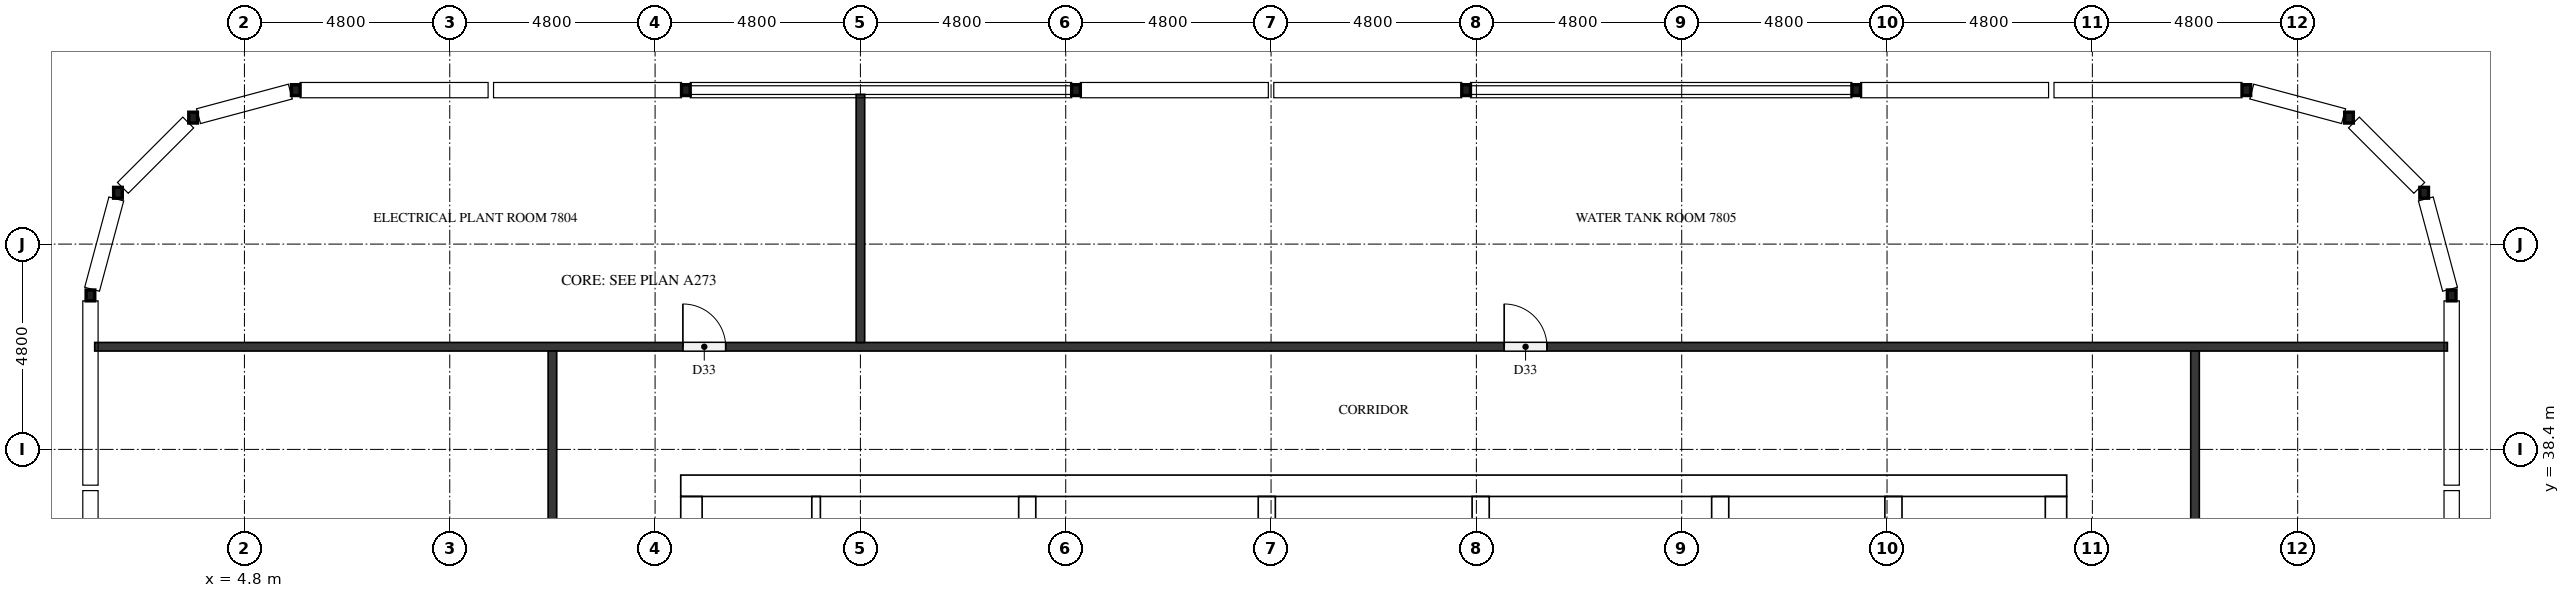
"""IFC4 building model, lengths in metres.
Left out: names, types, materials, properties, quantities, classifications, styles, units other than length and angle.
Written with IfcOpenShell. Run it as: python <this file> out.ifc"""

import sys

from ifc_helpers import new_model, si_unit, direction, frame, frame_2d, origin, origin_2d, place, context, subcontext, project, spatial, rectangle, hollow_rectangle, extrude, element, fill, save


model = new_model("IFC4")
c1 = context("Model", 3, precision=1e-05, world=origin(), true_north=direction((0.0, 1.0)))
c2 = subcontext(c1, "Body", "Model", "MODEL_VIEW")
j1 = project(units=[si_unit("LENGTHUNIT", "METRE"), si_unit("PLANEANGLEUNIT", "RADIAN")], contexts=[c1])
p1 = place(None, origin())
s1 = spatial("IfcSite", under=j1, at=p1, CompositionType="ELEMENT")
p2 = place(p1, origin())
s2 = spatial("IfcBuilding", under=s1, at=p2, CompositionType="ELEMENT")
p3 = place(p2, frame((0.0, 0.0, 301.1)))
s3 = spatial("IfcBuildingStorey", under=s2, at=p3, CompositionType="ELEMENT", Elevation=301.1)
p4 = place(p3, frame((15.0, 37.55, 0.0), z_axis=(0.0, 0.0, 1.0), x_axis=(1.0, 0.0, 0.0)))
e1 = element("IfcWall", 1, at=p4, inside=s3, PredefinedType="SHEAR", context=c2, shape_type="SweptSolid", body=[
    extrude(rectangle(XDim=32.4, YDim=0.5, at=frame_2d((16.2, 0.0))), origin(), (0.0, 0.0, 1.0), 4.4),
])
p5 = place(p4, frame((15.3, 0.0, 0.0)))
e2 = element("IfcOpeningElement", 2, at=p5, cuts=e1, PredefinedType="OPENING", context=c2, shape_type="SweptSolid", body=[
    extrude(rectangle(XDim=1.8, YDim=2.1, at=frame_2d((0.9, 1.05))), frame((0.0, 0.26, 0.0), z_axis=(0.0, -1.0, 0.0), x_axis=(1.0, 0.0, 0.0)), (0.0, 0.0, 1.0), 0.52),
])
p6 = place(p4, frame((1.282, 0.0, 0.0)))
e3 = element("IfcOpeningElement", 3, at=p6, cuts=e1, PredefinedType="OPENING", context=c2, shape_type="SweptSolid", body=[
    extrude(rectangle(XDim=1.0, YDim=2.1, at=frame_2d((0.5, 1.05))), frame((0.0, 0.26, 0.0), z_axis=(0.0, -1.0, 0.0), x_axis=(1.0, 0.0, 0.0)), (0.0, 0.0, 1.0), 0.52),
])
p7 = place(p4, frame((5.082, 0.0, 0.0)))
e4 = element("IfcOpeningElement", 4, at=p7, cuts=e1, PredefinedType="OPENING", context=c2, shape_type="SweptSolid", body=[
    extrude(rectangle(XDim=1.0, YDim=2.1, at=frame_2d((0.5, 1.05))), frame((0.0, 0.26, 0.0), z_axis=(0.0, -1.0, 0.0), x_axis=(1.0, 0.0, 0.0)), (0.0, 0.0, 1.0), 0.52),
])
p8 = place(p3, frame((15.25, 15.5, 0.0), z_axis=(0.0, 0.0, 1.0), x_axis=(0.0, 1.0, 0.0)))
e5 = element("IfcWall", 5, at=p8, inside=s3, PredefinedType="SHEAR", context=c2, shape_type="SweptSolid", body=[
    extrude(rectangle(XDim=21.8, YDim=0.5, at=frame_2d((10.9, 0.0))), origin(), (0.0, 0.0, 1.0), 4.4),
])
p9 = place(p8, frame((5.26, 0.0, 0.0)))
e6 = element("IfcOpeningElement", 6, at=p9, cuts=e5, PredefinedType="OPENING", context=c2, shape_type="SweptSolid", body=[
    extrude(rectangle(XDim=1.2, YDim=2.1, at=frame_2d((0.6, 1.05))), frame((0.0, 0.26, 0.0), z_axis=(0.0, -1.0, 0.0), x_axis=(1.0, 0.0, 0.0)), (0.0, 0.0, 1.0), 0.52),
])
p10 = place(p3, frame((47.15, 15.5, 0.0), z_axis=(0.0, 0.0, 1.0), x_axis=(0.0, 1.0, 0.0)))
e7 = element("IfcWall", 7, at=p10, inside=s3, PredefinedType="SHEAR", context=c2, shape_type="SweptSolid", body=[
    extrude(rectangle(XDim=21.8, YDim=0.5, at=frame_2d((10.9, 0.0))), origin(), (0.0, 0.0, 1.0), 4.4),
])
p11 = place(p10, frame((10.6, 0.0, 0.0)))
e8 = element("IfcOpeningElement", 8, at=p11, cuts=e7, PredefinedType="OPENING", context=c2, shape_type="SweptSolid", body=[
    extrude(rectangle(XDim=1.2, YDim=2.1, at=frame_2d((0.6, 1.05))), frame((0.0, 0.26, 0.0), z_axis=(0.0, -1.0, 0.0), x_axis=(1.0, 0.0, 0.0)), (0.0, 0.0, 1.0), 0.52),
])
p12 = place(p3, frame((23.1, 15.5, 0.0), z_axis=(0.0, 0.0, 1.0), x_axis=(0.0, 1.0, 0.0)))
e9 = element("IfcWall", 9, at=p12, inside=s3, PredefinedType="SHEAR", context=c2, shape_type="SweptSolid", body=[
    extrude(rectangle(XDim=21.8, YDim=0.4, at=frame_2d((10.9, 0.0))), origin(), (0.0, 0.0, 1.0), 4.4),
])
p13 = place(p3, frame((39.3, 27.75, 0.0), z_axis=(0.0, 0.0, 1.0), x_axis=(0.0, 1.0, 0.0)))
e10 = element("IfcWall", 10, at=p13, inside=s3, PredefinedType="SHEAR", context=c2, shape_type="SweptSolid", body=[
    extrude(rectangle(XDim=9.55, YDim=0.4, at=frame_2d((4.775, 0.0))), origin(), (0.0, 0.0, 1.0), 4.4),
])
p14 = place(p3, frame((43.35, 27.75, 0.0), z_axis=(0.0, 0.0, 1.0), x_axis=(0.0, 1.0, 0.0)))
e11 = element("IfcWall", 11, at=p14, inside=s3, PredefinedType="SHEAR", context=c2, shape_type="SweptSolid", body=[
    extrude(rectangle(XDim=9.55, YDim=0.4, at=frame_2d((4.775, 0.0))), origin(), (0.0, 0.0, 1.0), 4.4),
])
p15 = place(p14, frame((7.65, 0.0, 0.0)))
e12 = element("IfcOpeningElement", 12, at=p15, cuts=e11, PredefinedType="OPENING", context=c2, shape_type="SweptSolid", body=[
    extrude(rectangle(XDim=1.2, YDim=2.1, at=frame_2d((0.6, 1.05))), frame((0.0, 0.21, 0.0), z_axis=(0.0, -1.0, 0.0), x_axis=(1.0, 0.0, 0.0)), (0.0, 0.0, 1.0), 0.42),
])
for number, where, z_axis, x_axis in (
    (13, (28.7, 33.75, 0.0), (0.0, 0.0, 1.0), (0.0, 1.0, 0.0)),
    (14, (33.7, 33.75, 0.0), (0.0, 0.0, 1.0), (0.0, 1.0, 0.0)),
):
    element("IfcWall", number, at=place(p3, frame(where, z_axis=z_axis, x_axis=x_axis)), inside=s3, PredefinedType="SHEAR", context=c2, shape_type="SweptSolid", body=[
        extrude(rectangle(XDim=3.55, YDim=0.4, at=frame_2d((1.775, 0.0))), origin(), (0.0, 0.0, 1.0), 4.4),
    ])
for number, where, z_axis, x_axis in (
    (15, (56.4, 42.0, 0.0), (0.0, 0.0, 1.0), (1.0, 0.0, 0.0)),
    (16, (55.757, 44.4, 0.0), (0.0, 0.0, 1.0), (1.0, 0.0, 0.0)),
    (17, (54.0, 46.157, 0.0), (0.0, 0.0, 1.0), (1.0, 0.0, 0.0)),
    (18, (51.6, 46.8, 0.0), (0.0, 0.0, 1.0), (1.0, 0.0, 0.0)),
    (19, (42.48, 46.8, 0.0), (0.0, 0.0, 1.0), (1.0, 0.0, 0.0)),
    (20, (33.36, 46.8, 0.0), (0.0, 0.0, 1.0), (1.0, 0.0, 0.0)),
    (21, (24.24, 46.8, 0.0), (0.0, 0.0, 1.0), (1.0, 0.0, 0.0)),
    (22, (15.12, 46.8, 0.0), (0.0, 0.0, 1.0), (1.0, 0.0, 0.0)),
    (23, (6.0, 46.8, 0.0), (0.0, 0.0, 1.0), (1.0, 0.0, 0.0)),
    (24, (3.6, 46.157, 0.0), (0.0, 0.0, 1.0), (1.0, 0.0, 0.0)),
    (25, (1.843, 44.4, 0.0), (0.0, 0.0, 1.0), (1.0, 0.0, 0.0)),
    (26, (1.2, 42.0, 0.0), (0.0, 0.0, 1.0), (1.0, 0.0, 0.0)),
):
    element("IfcColumn", number, at=place(p3, frame(where, z_axis=z_axis, x_axis=x_axis)), inside=s3, PredefinedType="COLUMN", context=c2, shape_type="SweptSolid", body=[
        extrude(hollow_rectangle(XDim=0.203, YDim=0.254, WallThickness=0.01, InnerFilletRadius=0.004, OuterFilletRadius=0.013, at=origin_2d()), origin(), (0.0, 0.0, 1.0), 4.4),
    ])
p16 = place(p3, frame((18.164, 31.45, 0.0), z_axis=(0.0, 0.0, 1.0), x_axis=(0.0, 1.0, 0.0)))
e27 = element("IfcWall", 27, at=p16, inside=s3, PredefinedType="PARTITIONING", context=c2, shape_type="SweptSolid", body=[
    extrude(rectangle(XDim=5.85, YDim=0.2, at=frame_2d((2.925, 0.0))), origin(), (0.0, 0.0, 1.0), 4.4),
])
p17 = place(p3, frame((1.3, 40.8, 0.0), z_axis=(0.0, 0.0, 1.0), x_axis=(1.0, 0.0, 0.0)))
e28 = element("IfcWall", 28, at=p17, inside=s3, PredefinedType="PARTITIONING", context=c2, shape_type="SweptSolid", body=[
    extrude(rectangle(XDim=55.0, YDim=0.2, at=frame_2d((27.5, 0.0))), origin(), (0.0, 0.0, 1.0), 4.4),
])
p18 = place(p17, frame((13.75, 0.0, 0.0)))
e29 = element("IfcOpeningElement", 29, at=p18, cuts=e28, PredefinedType="OPENING", context=c2, shape_type="SweptSolid", body=[
    extrude(rectangle(XDim=1.0, YDim=2.1, at=frame_2d((0.5, 1.05))), frame((0.0, 0.11, 0.0), z_axis=(0.0, -1.0, 0.0), x_axis=(1.0, 0.0, 0.0)), (0.0, 0.0, 1.0), 0.22),
])
p19 = place(p17, frame((32.95, 0.0, 0.0)))
e30 = element("IfcOpeningElement", 30, at=p19, cuts=e28, PredefinedType="OPENING", context=c2, shape_type="SweptSolid", body=[
    extrude(rectangle(XDim=1.0, YDim=2.1, at=frame_2d((0.5, 1.05))), frame((0.0, 0.11, 0.0), z_axis=(0.0, -1.0, 0.0), x_axis=(1.0, 0.0, 0.0)), (0.0, 0.0, 1.0), 0.22),
])
p20 = place(p3, frame((12.0, 12.1, 0.0), z_axis=(0.0, 0.0, 1.0), x_axis=(0.0, 1.0, 0.0)))
e31 = element("IfcWall", 31, at=p20, inside=s3, PredefinedType="PARTITIONING", context=c2, shape_type="SweptSolid", body=[
    extrude(rectangle(XDim=28.6, YDim=0.2, at=frame_2d((14.3, 0.0))), origin(), (0.0, 0.0, 1.0), 4.4),
])
p21 = place(p20, frame((13.75, 0.0, 0.0)))
e32 = element("IfcOpeningElement", 32, at=p21, cuts=e31, PredefinedType="OPENING", context=c2, shape_type="SweptSolid", body=[
    extrude(rectangle(XDim=1.0, YDim=2.1, at=frame_2d((0.5, 1.05))), frame((0.0, 0.11, 0.0), z_axis=(0.0, -1.0, 0.0), x_axis=(1.0, 0.0, 0.0)), (0.0, 0.0, 1.0), 0.22),
])
p22 = place(p3, frame((19.2, 40.9, 0.0), z_axis=(0.0, 0.0, 1.0), x_axis=(0.0, 1.0, 0.0)))
e33 = element("IfcWall", 33, at=p22, inside=s3, PredefinedType="PARTITIONING", context=c2, shape_type="SweptSolid", body=[
    extrude(rectangle(XDim=5.8, YDim=0.2, at=frame_2d((2.9, 0.0))), origin(), (0.0, 0.0, 1.0), 4.4),
])
p23 = place(p3, frame((50.4, 40.7, 0.0), z_axis=(0.0, 0.0, 1.0), x_axis=(0.0, -1.0, 0.0)))
e34 = element("IfcWall", 34, at=p23, inside=s3, PredefinedType="PARTITIONING", context=c2, shape_type="SweptSolid", body=[
    extrude(rectangle(XDim=28.6, YDim=0.2, at=frame_2d((14.3, 0.0))), origin(), (0.0, 0.0, 1.0), 4.4),
])
p24 = place(p23, frame((13.75, 0.0, 0.0)))
e35 = element("IfcOpeningElement", 35, at=p24, cuts=e34, PredefinedType="OPENING", context=c2, shape_type="SweptSolid", body=[
    extrude(rectangle(XDim=1.0, YDim=2.1, at=frame_2d((0.5, 1.05))), frame((0.0, 0.11, 0.0), z_axis=(0.0, -1.0, 0.0), x_axis=(1.0, 0.0, 0.0)), (0.0, 0.0, 1.0), 0.22),
])
p25 = place(p5, origin())
e36 = element("IfcDoor", 36, at=p25, inside=s3, OperationType="DOUBLE_DOOR_SINGLE_SWING", PredefinedType="DOOR", context=c2, shape_type="SweptSolid", body=[
    extrude(rectangle(XDim=1.8, YDim=2.1, at=frame_2d((0.9, 1.05))), frame((0.0, 0.025, 0.0), z_axis=(0.0, -1.0, 0.0), x_axis=(1.0, 0.0, 0.0)), (0.0, 0.0, 1.0), 0.05),
])
fill(e2, e36)
p26 = place(p6, origin())
e37 = element("IfcDoor", 37, at=p26, inside=s3, OperationType="SINGLE_SWING_LEFT", PredefinedType="DOOR", context=c2, shape_type="SweptSolid", body=[
    extrude(rectangle(XDim=1.0, YDim=2.1, at=frame_2d((0.5, 1.05))), frame((0.0, 0.025, 0.0), z_axis=(0.0, -1.0, 0.0), x_axis=(1.0, 0.0, 0.0)), (0.0, 0.0, 1.0), 0.05),
])
fill(e3, e37)
p27 = place(p7, origin())
e38 = element("IfcDoor", 38, at=p27, inside=s3, OperationType="SINGLE_SWING_RIGHT", PredefinedType="DOOR", context=c2, shape_type="SweptSolid", body=[
    extrude(rectangle(XDim=1.0, YDim=2.1, at=frame_2d((0.5, 1.05))), frame((0.0, 0.025, 0.0), z_axis=(0.0, -1.0, 0.0), x_axis=(1.0, 0.0, 0.0)), (0.0, 0.0, 1.0), 0.05),
])
fill(e4, e38)
p28 = place(p18, origin())
e39 = element("IfcDoor", 39, at=p28, inside=s3, OperationType="SINGLE_SWING_LEFT", PredefinedType="DOOR", context=c2, shape_type="SweptSolid", body=[
    extrude(rectangle(XDim=1.0, YDim=2.1, at=frame_2d((0.5, 1.05))), frame((0.0, 0.025, 0.0), z_axis=(0.0, -1.0, 0.0), x_axis=(1.0, 0.0, 0.0)), (0.0, 0.0, 1.0), 0.05),
])
fill(e29, e39)
p29 = place(p19, origin())
e40 = element("IfcDoor", 40, at=p29, inside=s3, OperationType="SINGLE_SWING_LEFT", PredefinedType="DOOR", context=c2, shape_type="SweptSolid", body=[
    extrude(rectangle(XDim=1.0, YDim=2.1, at=frame_2d((0.5, 1.05))), frame((0.0, 0.025, 0.0), z_axis=(0.0, -1.0, 0.0), x_axis=(1.0, 0.0, 0.0)), (0.0, 0.0, 1.0), 0.05),
])
fill(e30, e40)
save(model, sys.argv[1])
